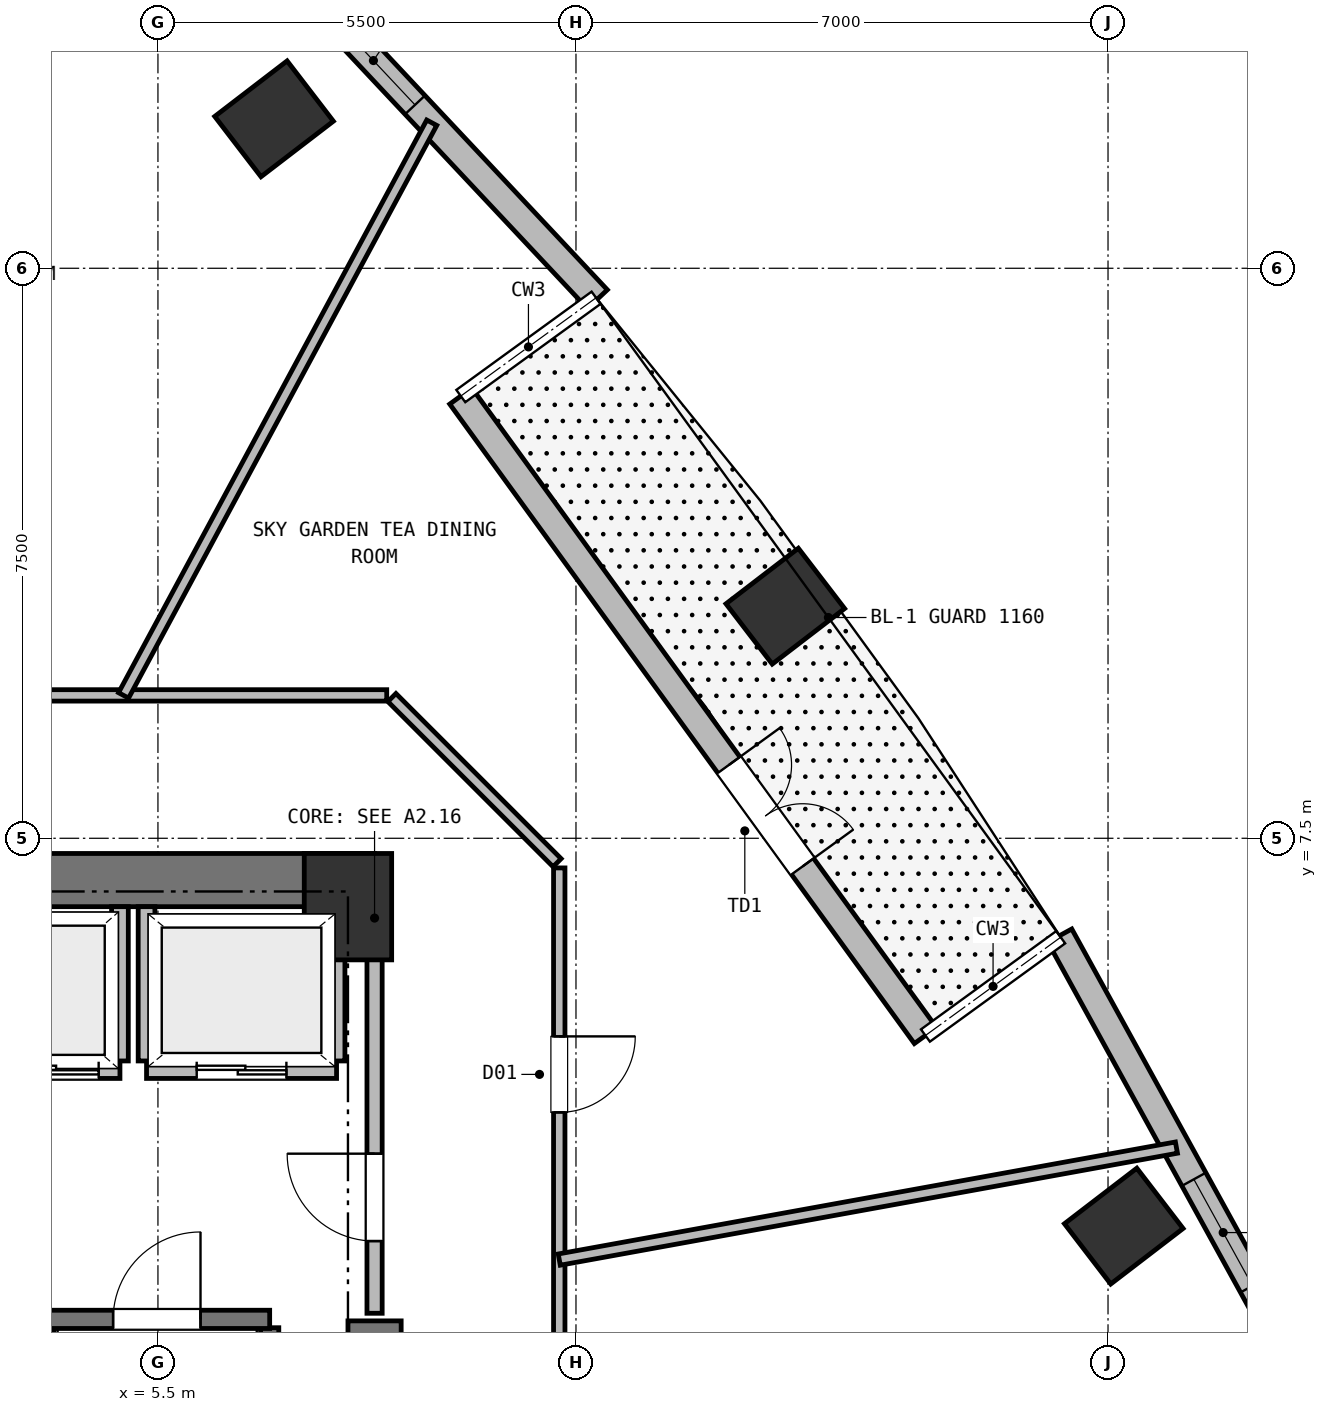
"""IFC4 building model, lengths in metres.
Left out: names, types, materials, properties, quantities, classifications, styles, units other than length and angle.
Written with IfcOpenShell. Run it as: python <this file> out.ifc"""

import sys

from ifc_helpers import new_model, si_unit, direction, frame, frame_2d, origin, origin_2d, place, context, subcontext, project, spatial, rectangle, extrude, element, fill, save


model = new_model("IFC4")
c1 = context("Model", 3, precision=1e-05, world=origin(), true_north=direction((0.0, 1.0)))
c2 = subcontext(c1, "Body", "Model", "MODEL_VIEW")
j1 = project(units=[si_unit("LENGTHUNIT", "METRE"), si_unit("PLANEANGLEUNIT", "RADIAN")], contexts=[c1])
p1 = place(None, origin())
s1 = spatial("IfcSite", under=j1, at=p1, CompositionType="ELEMENT")
p2 = place(p1, origin())
s2 = spatial("IfcBuilding", under=s1, at=p2, CompositionType="ELEMENT")
p3 = place(p2, frame((0.0, 0.0, 53.0)))
s3 = spatial("IfcBuildingStorey", under=s2, at=p3, CompositionType="ELEMENT", Elevation=53.0)
p4 = place(p3, frame((8.0, 6.6, 0.0), z_axis=(0.0, 0.0, 1.0), x_axis=(1.0, 0.0, 0.0)))
e1 = element("IfcColumn", 1, at=p4, inside=s3, PredefinedType="COLUMN", context=c2, shape_type="SweptSolid", body=[
    extrude(rectangle(XDim=1.15, YDim=1.4, at=origin_2d()), origin(), (0.0, 0.0, 1.0), 3.75),
])
p5 = place(p3, frame((-8.35, 6.95, 0.0), z_axis=(0.0, 0.0, 1.0), x_axis=(1.0, 0.0, 0.0)))
e2 = element("IfcWall", 2, at=p5, inside=s3, PredefinedType="SHEAR", context=c2, shape_type="SweptSolid", body=[
    extrude(rectangle(XDim=16.7, YDim=0.7, at=frame_2d((8.35, 0.0))), origin(), (0.0, 0.0, 1.0), 3.5),
])
p6 = place(p3, frame((8.35, -6.95, 0.0), z_axis=(0.0, 0.0, 1.0), x_axis=(0.0, 1.0, 0.0)))
e3 = element("IfcWall", 3, at=p6, inside=s3, PredefinedType="SHEAR", context=c2, shape_type="SweptSolid", body=[
    extrude(rectangle(XDim=8.1, YDim=0.7, at=frame_2d((4.05, 0.0))), origin(), (0.0, 0.0, 1.0), 3.5),
])
for number, where, z_axis, x_axis in (
    (4, (18.207, 2.397, 0.0), (0.0, 0.0, 1.0), (-0.609, 0.793, 0.0)),
    (5, (13.754, 10.554, 0.0), (0.0, 0.0, 1.0), (-0.609, 0.793, 0.0)),
    (6, (7.028, 16.966, 0.0), (0.0, 0.0, 1.0), (-0.609, 0.793, 0.0)),
):
    element("IfcColumn", number, at=place(p3, frame(where, z_axis=z_axis, x_axis=x_axis)), inside=s3, PredefinedType="COLUMN", context=c2, shape_type="SweptSolid", body=[
        extrude(rectangle(XDim=1.0, YDim=1.2, at=origin_2d()), origin(), (0.0, 0.0, 1.0), 3.75),
    ])
p7 = place(p3, frame((9.485, 13.319, 0.0), z_axis=(0.0, 0.0, 1.0), x_axis=(0.587787785243, -0.809015154073, 0.0)))
e7 = element("IfcWall", 7, at=p7, inside=s3, PredefinedType="SOLIDWALL", context=c2, shape_type="SweptSolid", body=[
    extrude(rectangle(XDim=10.4, YDim=0.36, at=frame_2d((5.2, 0.0))), origin(), (0.0, 0.0, 1.0), 3.5),
])
p8 = place(p7, frame((6.0, 0.0, 0.0)))
e8 = element("IfcOpeningElement", 8, at=p8, cuts=e7, PredefinedType="OPENING", context=c2, shape_type="SweptSolid", body=[
    extrude(rectangle(XDim=1.65, YDim=2.25, at=frame_2d((0.825, 1.125))), frame((0.0, 0.19, 0.0), z_axis=(0.0, -1.0, 0.0), x_axis=(1.0, 0.0, 0.0)), (0.0, 0.0, 1.0), 0.38),
])
p9 = place(p3, frame((17.365, 6.22, 0.0), z_axis=(0.0, 0.0, 1.0), x_axis=(0.481970134715, -0.876187644995, 0.0)))
e9 = element("IfcWall", 9, at=p9, inside=s3, PredefinedType="SOLIDWALL", context=c2, shape_type="SweptSolid", body=[
    extrude(rectangle(XDim=6.566, YDim=0.36, at=frame_2d((3.283, 0.0))), origin(), (0.0, 0.0, 1.0), 3.5),
])
p10 = place(p9, frame((3.66, 0.0, 0.72)))
e10 = element("IfcOpeningElement", 10, at=p10, cuts=e9, PredefinedType="OPENING", context=c2, shape_type="SweptSolid", body=[
    extrude(rectangle(XDim=1.6, YDim=1.88, at=frame_2d((0.8, 0.94))), frame((0.0, 0.19, 0.0), z_axis=(0.0, -1.0, 0.0), x_axis=(1.0, 0.0, 0.0)), (0.0, 0.0, 1.0), 0.38),
])
p11 = place(p3, frame((6.788, 19.381, 0.0), z_axis=(0.0, 0.0, 1.0), x_axis=(0.684367736507, -0.729137025002, 0.0)))
e11 = element("IfcWall", 11, at=p11, inside=s3, PredefinedType="SOLIDWALL", context=c2, shape_type="SweptSolid", body=[
    extrude(rectangle(XDim=6.566, YDim=0.36, at=frame_2d((3.283, 0.0))), origin(), (0.0, 0.0, 1.0), 3.5),
])
p12 = place(p11, frame((1.46, 0.0, 0.72)))
e12 = element("IfcOpeningElement", 12, at=p12, cuts=e11, PredefinedType="OPENING", context=c2, shape_type="SweptSolid", body=[
    extrude(rectangle(XDim=1.6, YDim=1.88, at=frame_2d((0.8, 0.94))), frame((0.0, 0.19, 0.0), z_axis=(0.0, -1.0, 0.0), x_axis=(1.0, 0.0, 0.0)), (0.0, 0.0, 1.0), 0.38),
])
for number, where, z_axis, x_axis in (
    (13, (4.01, -6.16, 0.0), (0.0, 0.0, 1.0), (0.0, 1.0, 0.0)),
    (14, (6.97, -6.16, 0.0), (0.0, 0.0, 1.0), (0.0, 1.0, 0.0)),
):
    element("IfcWall", number, at=place(p3, frame(where, z_axis=z_axis, x_axis=x_axis)), inside=s3, PredefinedType="SHEAR", context=c2, shape_type="SweptSolid", body=[
        extrude(rectangle(XDim=7.22, YDim=0.24, at=frame_2d((3.61, 0.0))), origin(), (0.0, 0.0, 1.0), 3.5),
    ])
p13 = place(p3, frame((4.01, 1.17, 0.0), z_axis=(0.0, 0.0, 1.0), x_axis=(1.0, 0.0, 0.0)))
e15 = element("IfcWall", 15, at=p13, inside=s3, PredefinedType="SHEAR", context=c2, shape_type="SweptSolid", body=[
    extrude(rectangle(XDim=2.96, YDim=0.24, at=frame_2d((1.48, 0.0))), origin(), (0.0, 0.0, 1.0), 3.5),
])
p14 = place(p13, frame((0.9, 0.0, 0.0)))
e16 = element("IfcOpeningElement", 16, at=p14, cuts=e15, PredefinedType="OPENING", context=c2, shape_type="SweptSolid", body=[
    extrude(rectangle(XDim=1.15, YDim=2.15, at=frame_2d((0.575, 1.075))), frame((0.0, 0.13, 0.0), z_axis=(0.0, -1.0, 0.0), x_axis=(1.0, 0.0, 0.0)), (0.0, 0.0, 1.0), 0.26),
])
p15 = place(p3, frame((5.35, 4.45, 0.0), z_axis=(0.0, 0.0, 1.0), x_axis=(1.0, 0.0, 0.0)))
e17 = element("IfcWall", 17, at=p15, inside=s3, PredefinedType="PARTITIONING", context=c2, shape_type="SweptSolid", body=[
    extrude(rectangle(XDim=2.5, YDim=0.22, at=frame_2d((1.25, 0.0))), origin(), (0.0, 0.0, 1.0), 3.5),
])
p16 = place(p15, frame((0.66, 0.0, 0.0)))
e18 = element("IfcOpeningElement", 18, at=p16, cuts=e17, PredefinedType="OPENING", context=c2, shape_type="SweptSolid", body=[
    extrude(rectangle(XDim=1.18, YDim=2.15, at=frame_2d((0.59, 1.075))), frame((0.0, 0.12, 0.0), z_axis=(0.0, -1.0, 0.0), x_axis=(1.0, 0.0, 0.0)), (0.0, 0.0, 1.0), 0.24),
])
p17 = place(p3, frame((5.35, 4.57, 0.0), z_axis=(0.0, 0.0, 1.0), x_axis=(0.0, 1.0, 0.0)))
e19 = element("IfcWall", 19, at=p17, inside=s3, PredefinedType="PARTITIONING", context=c2, shape_type="SweptSolid", body=[
    extrude(rectangle(XDim=2.03, YDim=0.22, at=frame_2d((1.015, 0.0))), origin(), (0.0, 0.0, 1.0), 3.5),
])
p18 = place(p3, frame((7.85, 4.57, 0.0), z_axis=(0.0, 0.0, 1.0), x_axis=(0.0, 1.0, 0.0)))
e20 = element("IfcWall", 20, at=p18, inside=s3, PredefinedType="PARTITIONING", context=c2, shape_type="SweptSolid", body=[
    extrude(rectangle(XDim=2.03, YDim=0.22, at=frame_2d((1.015, 0.0))), origin(), (0.0, 0.0, 1.0), 3.08),
])
p19 = place(p3, frame((2.6, 4.45, 0.0), z_axis=(0.0, 0.0, 1.0), x_axis=(1.0, 0.0, 0.0)))
e21 = element("IfcWall", 21, at=p19, inside=s3, PredefinedType="PARTITIONING", context=c2, shape_type="SweptSolid", body=[
    extrude(rectangle(XDim=2.4, YDim=0.22, at=frame_2d((1.2, 0.0))), origin(), (0.0, 0.0, 1.0), 3.5),
])
p20 = place(p19, frame((0.9, 0.0, 0.0)))
e22 = element("IfcOpeningElement", 22, at=p20, cuts=e21, PredefinedType="OPENING", context=c2, shape_type="SweptSolid", body=[
    extrude(rectangle(XDim=1.22, YDim=2.15, at=frame_2d((0.61, 1.075))), frame((0.0, 0.12, 0.0), z_axis=(0.0, -1.0, 0.0), x_axis=(1.0, 0.0, 0.0)), (0.0, 0.0, 1.0), 0.24),
])
p21 = place(p3, frame((5.0, 4.57, 0.0), z_axis=(0.0, 0.0, 1.0), x_axis=(0.0, 1.0, 0.0)))
e23 = element("IfcWall", 23, at=p21, inside=s3, PredefinedType="PARTITIONING", context=c2, shape_type="SweptSolid", body=[
    extrude(rectangle(XDim=2.03, YDim=0.22, at=frame_2d((1.015, 0.0))), origin(), (0.0, 0.0, 1.0), 3.5),
])
p22 = place(p3, frame((8.35, 1.25, 0.0), z_axis=(0.0, 0.0, 1.0), x_axis=(0.0, 1.0, 0.0)))
e24 = element("IfcWall", 24, at=p22, inside=s3, PredefinedType="PARTITIONING", context=c2, shape_type="SweptSolid", body=[
    extrude(rectangle(XDim=5.3, YDim=0.2, at=frame_2d((2.65, 0.0))), origin(), (0.0, 0.0, 1.0), 3.5),
])
p23 = place(p22, frame((0.95, 0.0, 0.0)))
e25 = element("IfcOpeningElement", 25, at=p23, cuts=e24, PredefinedType="OPENING", context=c2, shape_type="SweptSolid", body=[
    extrude(rectangle(XDim=1.15, YDim=2.15, at=frame_2d((0.575, 1.075))), frame((0.0, 0.11, 0.0), z_axis=(0.0, -1.0, 0.0), x_axis=(1.0, 0.0, 0.0)), (0.0, 0.0, 1.0), 0.22),
])
p24 = place(p3, frame((10.78, 7.11, 0.0), z_axis=(0.0, 0.0, 1.0), x_axis=(0.0, -1.0, 0.0)))
e26 = element("IfcWall", 26, at=p24, inside=s3, PredefinedType="PARTITIONING", context=c2, shape_type="SweptSolid", body=[
    extrude(rectangle(XDim=14.22, YDim=0.15, at=frame_2d((7.11, 0.0))), origin(), (0.0, 0.0, 1.0), 3.12),
])
p25 = place(p24, frame((2.217, 0.0, 0.0)))
e27 = element("IfcOpeningElement", 27, at=p25, cuts=e26, PredefinedType="OPENING", context=c2, shape_type="SweptSolid", body=[
    extrude(rectangle(XDim=1.0, YDim=2.15, at=frame_2d((0.5, 1.075))), frame((0.0, 0.085, 0.0), z_axis=(0.0, -1.0, 0.0), x_axis=(1.0, 0.0, 0.0)), (0.0, 0.0, 1.0), 0.17),
])
p26 = place(p24, frame((6.276, 0.0, 0.0)))
e28 = element("IfcOpeningElement", 28, at=p26, cuts=e26, PredefinedType="OPENING", context=c2, shape_type="SweptSolid", body=[
    extrude(rectangle(XDim=1.06, YDim=2.15, at=frame_2d((0.53, 1.075))), frame((0.0, 0.085, 0.0), z_axis=(0.0, -1.0, 0.0), x_axis=(1.0, 0.0, 0.0)), (0.0, 0.0, 1.0), 0.17),
])
p27 = place(p24, frame((12.156, 0.0, 0.0)))
e29 = element("IfcOpeningElement", 29, at=p27, cuts=e26, PredefinedType="OPENING", context=c2, shape_type="SweptSolid", body=[
    extrude(rectangle(XDim=1.06, YDim=2.15, at=frame_2d((0.53, 1.075))), frame((0.0, 0.085, 0.0), z_axis=(0.0, -1.0, 0.0), x_axis=(1.0, 0.0, 0.0)), (0.0, 0.0, 1.0), 0.17),
])
p28 = place(p3, frame((8.578, 9.352, 0.0), z_axis=(0.0, 0.0, 1.0), x_axis=(0.707067066127, -0.707146494016, 0.0)))
e30 = element("IfcWall", 30, at=p28, inside=s3, PredefinedType="PARTITIONING", context=c2, shape_type="SweptSolid", body=[
    extrude(rectangle(XDim=3.074, YDim=0.15, at=frame_2d((1.537, 0.0))), origin(), (0.0, 0.0, 1.0), 3.5),
])
p29 = place(p3, frame((-8.51, 9.38, 0.0), z_axis=(0.0, 0.0, 1.0), x_axis=(1.0, 0.0, 0.0)))
e31 = element("IfcWall", 31, at=p29, inside=s3, PredefinedType="PARTITIONING", context=c2, shape_type="SweptSolid", body=[
    extrude(rectangle(XDim=17.02, YDim=0.15, at=frame_2d((8.51, 0.0))), origin(), (0.0, 0.0, 1.0), 3.5),
])
p30 = place(p29, frame((4.674, 0.0, 0.0)))
e32 = element("IfcOpeningElement", 32, at=p30, cuts=e31, PredefinedType="OPENING", context=c2, shape_type="SweptSolid", body=[
    extrude(rectangle(XDim=1.0, YDim=2.15, at=frame_2d((0.5, 1.075))), frame((0.0, 0.085, 0.0), z_axis=(0.0, -1.0, 0.0), x_axis=(1.0, 0.0, 0.0)), (0.0, 0.0, 1.0), 0.17),
])
p31 = place(p29, frame((10.163, 0.0, 0.0)))
e33 = element("IfcOpeningElement", 33, at=p31, cuts=e31, PredefinedType="OPENING", context=c2, shape_type="SweptSolid", body=[
    extrude(rectangle(XDim=1.0, YDim=2.15, at=frame_2d((0.5, 1.075))), frame((0.0, 0.085, 0.0), z_axis=(0.0, -1.0, 0.0), x_axis=(1.0, 0.0, 0.0)), (0.0, 0.0, 1.0), 0.17),
])
p32 = place(p3, frame((10.78, 1.956, 0.0), z_axis=(0.0, 0.0, 1.0), x_axis=(0.983928549694, 0.178562619542, 0.0)))
e34 = element("IfcWall", 34, at=p32, inside=s3, PredefinedType="PARTITIONING", context=c2, shape_type="SweptSolid", body=[
    extrude(rectangle(XDim=8.253, YDim=0.15, at=frame_2d((4.126, 0.0))), origin(), (0.0, 0.0, 1.0), 3.5),
])
p33 = place(p3, frame((5.048, 9.38, 0.0), z_axis=(0.0, 0.0, 1.0), x_axis=(0.473842892952, 0.880609398541, 0.0)))
e35 = element("IfcWall", 35, at=p33, inside=s3, PredefinedType="PARTITIONING", context=c2, shape_type="SweptSolid", body=[
    extrude(rectangle(XDim=8.557, YDim=0.15, at=frame_2d((4.279, 0.0))), origin(), (0.0, 0.0, 1.0), 3.5),
])
p34 = place(p8, origin())
e36 = element("IfcDoor", 36, at=p34, inside=s3, OperationType="DOUBLE_DOOR_SINGLE_SWING", PredefinedType="DOOR", context=c2, shape_type="SweptSolid", body=[
    extrude(rectangle(XDim=1.65, YDim=2.25, at=frame_2d((0.825, 1.125))), frame((0.0, 0.025, 0.0), z_axis=(0.0, -1.0, 0.0), x_axis=(1.0, 0.0, 0.0)), (0.0, 0.0, 1.0), 0.05),
])
fill(e8, e36)
p35 = place(p10, origin())
e37 = element("IfcWindow", 37, at=p35, inside=s3, PartitioningType="SINGLE_PANEL", PredefinedType="WINDOW", context=c2, shape_type="SweptSolid", body=[
    extrude(rectangle(XDim=1.6, YDim=1.88, at=frame_2d((0.8, 0.94))), frame((0.0, 0.03, 0.0), z_axis=(0.0, -1.0, 0.0), x_axis=(1.0, 0.0, 0.0)), (0.0, 0.0, 1.0), 0.06),
])
fill(e10, e37)
p36 = place(p12, origin())
e38 = element("IfcWindow", 38, at=p36, inside=s3, PartitioningType="SINGLE_PANEL", PredefinedType="WINDOW", context=c2, shape_type="SweptSolid", body=[
    extrude(rectangle(XDim=1.6, YDim=1.88, at=frame_2d((0.8, 0.94))), frame((0.0, 0.03, 0.0), z_axis=(0.0, -1.0, 0.0), x_axis=(1.0, 0.0, 0.0)), (0.0, 0.0, 1.0), 0.06),
])
fill(e12, e38)
p37 = place(p14, origin())
e39 = element("IfcDoor", 39, at=p37, inside=s3, OperationType="SINGLE_SWING_RIGHT", PredefinedType="DOOR", context=c2, shape_type="SweptSolid", body=[
    extrude(rectangle(XDim=1.15, YDim=2.15, at=frame_2d((0.575, 1.075))), frame((0.0, 0.025, 0.0), z_axis=(0.0, -1.0, 0.0), x_axis=(1.0, 0.0, 0.0)), (0.0, 0.0, 1.0), 0.05),
])
fill(e16, e39)
p38 = place(p16, origin())
e40 = element("IfcDoor", 40, at=p38, inside=s3, OperationType="DOUBLE_DOOR_SLIDING", PredefinedType="DOOR", context=c2, shape_type="SweptSolid", body=[
    extrude(rectangle(XDim=1.18, YDim=2.15, at=frame_2d((0.59, 1.075))), frame((0.0, 0.025, 0.0), z_axis=(0.0, -1.0, 0.0), x_axis=(1.0, 0.0, 0.0)), (0.0, 0.0, 1.0), 0.05),
])
fill(e18, e40)
p39 = place(p20, origin())
e41 = element("IfcDoor", 41, at=p39, inside=s3, OperationType="DOUBLE_DOOR_SLIDING", PredefinedType="DOOR", context=c2, shape_type="SweptSolid", body=[
    extrude(rectangle(XDim=1.22, YDim=2.15, at=frame_2d((0.61, 1.075))), frame((0.0, 0.025, 0.0), z_axis=(0.0, -1.0, 0.0), x_axis=(1.0, 0.0, 0.0)), (0.0, 0.0, 1.0), 0.05),
])
fill(e22, e41)
p40 = place(p23, origin())
e42 = element("IfcDoor", 42, at=p40, inside=s3, OperationType="SINGLE_SWING_RIGHT", PredefinedType="DOOR", context=c2, shape_type="SweptSolid", body=[
    extrude(rectangle(XDim=1.15, YDim=2.15, at=frame_2d((0.575, 1.075))), frame((0.0, 0.025, 0.0), z_axis=(0.0, -1.0, 0.0), x_axis=(1.0, 0.0, 0.0)), (0.0, 0.0, 1.0), 0.05),
])
fill(e25, e42)
p41 = place(p25, origin())
e43 = element("IfcDoor", 43, at=p41, inside=s3, OperationType="SINGLE_SWING_LEFT", PredefinedType="DOOR", context=c2, shape_type="SweptSolid", body=[
    extrude(rectangle(XDim=1.0, YDim=2.15, at=frame_2d((0.5, 1.075))), frame((0.0, 0.025, 0.0), z_axis=(0.0, -1.0, 0.0), x_axis=(1.0, 0.0, 0.0)), (0.0, 0.0, 1.0), 0.05),
])
fill(e27, e43)
save(model, sys.argv[1])
